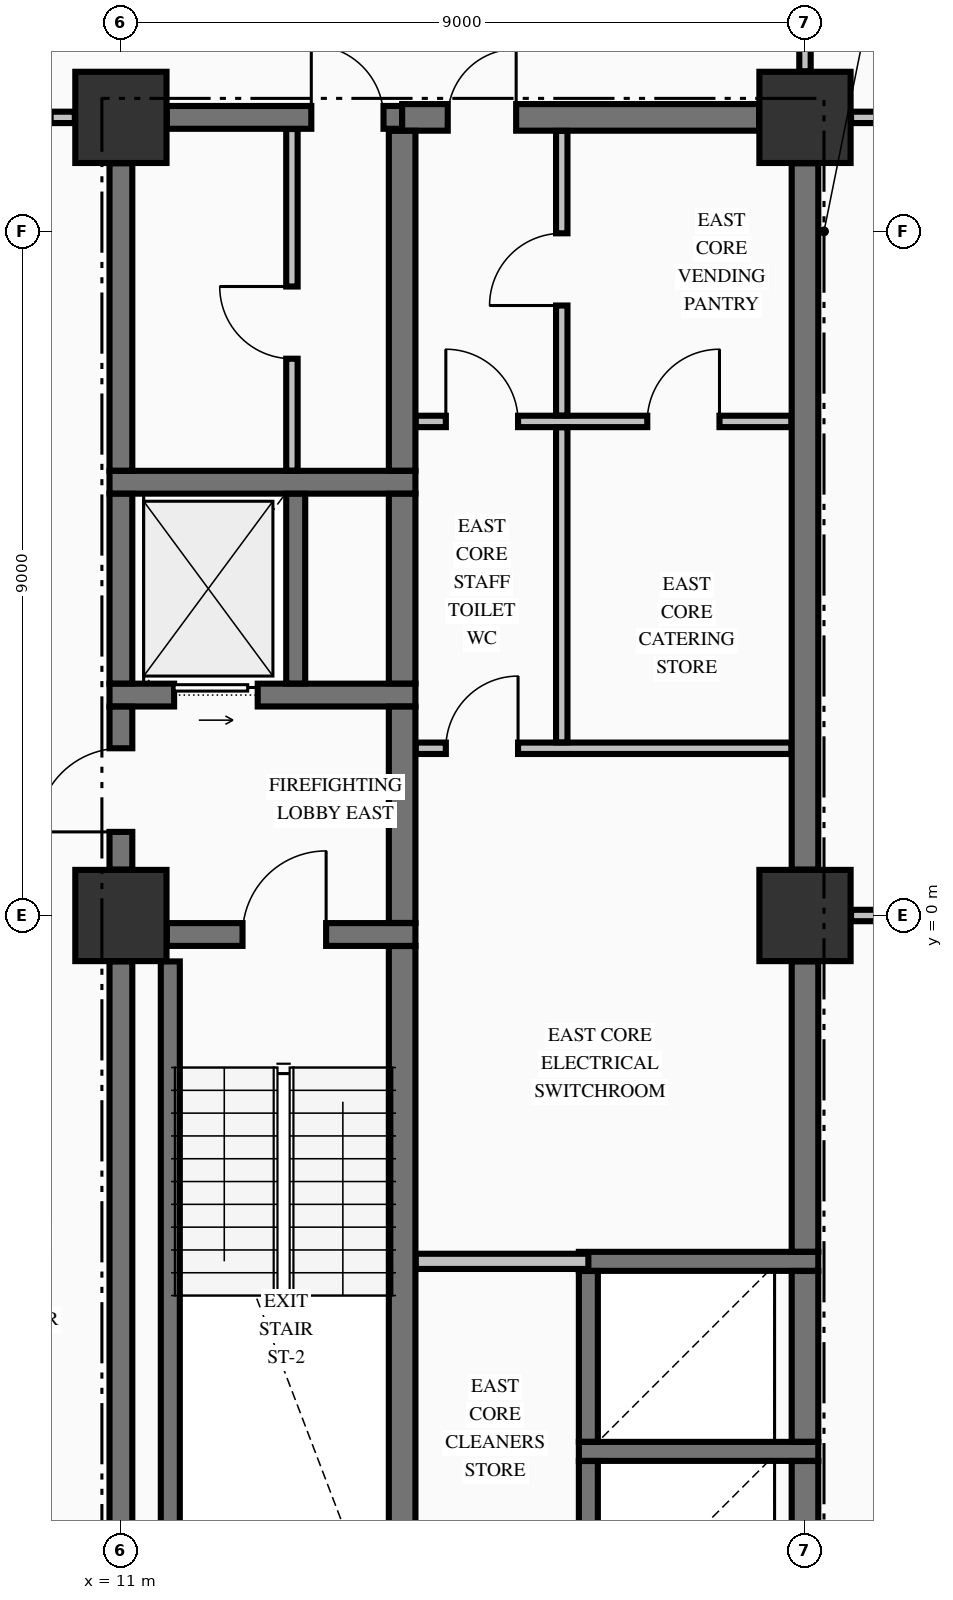
"""IFC4 building model, lengths in metres.
Left out: names, types, materials, properties, quantities, classifications, styles, units other than length and angle.
Written with IfcOpenShell. Run it as: python <this file> out.ifc"""

import sys

from ifc_helpers import new_model, si_unit, direction, frame, frame_2d, origin, origin_2d, place, context, subcontext, project, spatial, rectangle, extrude, element, fill, save


model = new_model("IFC4")
c1 = context("Model", 3, precision=1e-05, world=origin(), true_north=direction((0.0, 1.0)))
c2 = subcontext(c1, "Body", "Model", "MODEL_VIEW")
j1 = project(units=[si_unit("LENGTHUNIT", "METRE"), si_unit("PLANEANGLEUNIT", "RADIAN")], contexts=[c1])
p1 = place(None, origin())
s1 = spatial("IfcSite", under=j1, at=p1, CompositionType="ELEMENT")
p2 = place(p1, origin())
s2 = spatial("IfcBuilding", under=s1, at=p2, CompositionType="ELEMENT")
p3 = place(p2, frame((0.0, 0.0, 67.9)))
s3 = spatial("IfcBuildingStorey", under=s2, at=p3, CompositionType="ELEMENT", Elevation=67.9)
for number, where, z_axis, x_axis in (
    (1, (11.0, 0.0, -0.25), (0.0, 0.0, 1.0), (1.0, 0.0, 0.0)),
    (2, (11.0, 10.5, -0.25), (0.0, 0.0, 1.0), (1.0, 0.0, 0.0)),
    (3, (20.0, 10.5, -0.25), (0.0, 0.0, 1.0), (1.0, 0.0, 0.0)),
    (4, (20.0, 0.0, -0.25), (0.0, 0.0, 1.0), (1.0, 0.0, 0.0)),
):
    element("IfcColumn", number, at=place(p3, frame(where, z_axis=z_axis, x_axis=x_axis)), inside=s3, PredefinedType="COLUMN", context=c2, shape_type="SweptSolid", body=[
        extrude(rectangle(XDim=1.2, YDim=1.2, at=origin_2d()), origin(), (0.0, 0.0, 1.0), 3.495),
    ])
for number, where, z_axis, x_axis in (
    (5, (17.025, -7.05, 0.0), (0.0, 0.0, 1.0), (1.0, 0.0, 0.0)),
    (6, (17.025, -4.55, 0.0), (0.0, 0.0, 1.0), (1.0, 0.0, 0.0)),
):
    element("IfcWall", number, at=place(p3, frame(where, z_axis=z_axis, x_axis=x_axis)), inside=s3, PredefinedType="SOLIDWALL", context=c2, shape_type="SweptSolid", body=[
        extrude(rectangle(XDim=3.15, YDim=0.25, at=frame_2d((1.575, 0.0))), origin(), (0.0, 0.0, 1.0), 3.245),
    ])
p4 = place(p3, frame((11.604, -0.25, 0.0), z_axis=(0.0, 0.0, 1.0), x_axis=(1.0, 0.0, 0.0)))
e7 = element("IfcWall", 7, at=p4, inside=s3, PredefinedType="SHEAR", context=c2, shape_type="SweptSolid", body=[
    extrude(rectangle(XDim=3.271, YDim=0.3, at=frame_2d((1.635, 0.0))), origin(), (0.0, 0.0, 1.0), 3.245),
])
p5 = place(p4, frame((0.996, 0.0, 0.0)))
e8 = element("IfcOpeningElement", 8, at=p5, cuts=e7, PredefinedType="OPENING", context=c2, shape_type="SweptSolid", body=[
    extrude(rectangle(XDim=1.1, YDim=2.15, at=frame_2d((0.55, 1.075))), frame((0.0, 0.16, 0.0), z_axis=(0.0, -1.0, 0.0), x_axis=(1.0, 0.0, 0.0)), (0.0, 0.0, 1.0), 0.32),
])
p6 = place(p3, frame((10.85, 2.9, 0.0), z_axis=(0.0, 0.0, 1.0), x_axis=(1.0, 0.0, 0.0)))
e9 = element("IfcWall", 9, at=p6, inside=s3, PredefinedType="SHEAR", context=c2, shape_type="SweptSolid", body=[
    extrude(rectangle(XDim=4.025, YDim=0.3, at=frame_2d((2.012, 0.0))), origin(), (0.0, 0.0, 1.0), 3.245),
])
p7 = place(p6, frame((0.85, 0.0, 0.0)))
e10 = element("IfcOpeningElement", 10, at=p7, cuts=e9, PredefinedType="OPENING", context=c2, shape_type="SweptSolid", body=[
    extrude(rectangle(XDim=1.1, YDim=2.2, at=frame_2d((0.55, 1.1))), frame((0.0, 0.16, 0.0), z_axis=(0.0, -1.0, 0.0), x_axis=(1.0, 0.0, 0.0)), (0.0, 0.0, 1.0), 0.32),
])
p8 = place(p3, frame((10.85, 5.7, 0.0), z_axis=(0.0, 0.0, 1.0), x_axis=(1.0, 0.0, 0.0)))
e11 = element("IfcWall", 11, at=p8, inside=s3, PredefinedType="SHEAR", context=c2, shape_type="SweptSolid", body=[
    extrude(rectangle(XDim=4.025, YDim=0.3, at=frame_2d((2.012, 0.0))), origin(), (0.0, 0.0, 1.0), 3.245),
])
p9 = place(p3, frame((11.604, 10.5, 0.0), z_axis=(0.0, 0.0, 1.0), x_axis=(1.0, 0.0, 0.0)))
e12 = element("IfcWall", 12, at=p9, inside=s3, PredefinedType="SHEAR", context=c2, shape_type="SweptSolid", body=[
    extrude(rectangle(XDim=3.096, YDim=0.3, at=frame_2d((1.548, 0.0))), origin(), (0.0, 0.0, 1.0), 3.245),
])
p10 = place(p9, frame((1.901, 0.0, 0.0)))
e13 = element("IfcOpeningElement", 13, at=p10, cuts=e12, PredefinedType="OPENING", context=c2, shape_type="SweptSolid", body=[
    extrude(rectangle(XDim=0.95, YDim=2.15, at=frame_2d((0.475, 1.075))), frame((0.0, 0.16, 0.0), z_axis=(0.0, -1.0, 0.0), x_axis=(1.0, 0.0, 0.0)), (0.0, 0.0, 1.0), 0.32),
])
p11 = place(p3, frame((14.7, 10.5, 0.0), z_axis=(0.0, 0.0, 1.0), x_axis=(1.0, 0.0, 0.0)))
e14 = element("IfcWall", 14, at=p11, inside=s3, PredefinedType="SHEAR", context=c2, shape_type="SweptSolid", body=[
    extrude(rectangle(XDim=4.696, YDim=0.35, at=frame_2d((2.348, 0.0))), origin(), (0.0, 0.0, 1.0), 3.245),
])
p12 = place(p11, frame((0.6, 0.0, 0.0)))
e15 = element("IfcOpeningElement", 15, at=p12, cuts=e14, PredefinedType="OPENING", context=c2, shape_type="SweptSolid", body=[
    extrude(rectangle(XDim=0.9, YDim=2.15, at=frame_2d((0.45, 1.075))), frame((0.0, 0.185, 0.0), z_axis=(0.0, -1.0, 0.0), x_axis=(1.0, 0.0, 0.0)), (0.0, 0.0, 1.0), 0.37),
])
p13 = place(p3, frame((14.878, -4.55, 0.0), z_axis=(0.0, 0.0, 1.0), x_axis=(1.0, 0.0, 0.0)))
e16 = element("IfcWall", 16, at=p13, inside=s3, PredefinedType="PARTITIONING", context=c2, shape_type="SweptSolid", body=[
    extrude(rectangle(XDim=2.272, YDim=0.2, at=frame_2d((1.136, 0.0))), origin(), (0.0, 0.0, 1.0), 3.245),
])
p14 = place(p3, frame((20.606, 0.0, 0.0), z_axis=(0.0, 0.0, 1.0), x_axis=(1.0, 0.0, 0.0)))
e17 = element("IfcWall", 17, at=p14, inside=s3, PredefinedType="PARTITIONING", context=c2, shape_type="SweptSolid", body=[
    extrude(rectangle(XDim=2.688, YDim=0.15, at=frame_2d((1.344, 0.0))), origin(), (0.0, 0.0, 1.0), 2.585),
])
p15 = place(p3, frame((14.878, 2.2, 0.0), z_axis=(0.0, 0.0, 1.0), x_axis=(1.0, 0.0, 0.0)))
e18 = element("IfcWall", 18, at=p15, inside=s3, PredefinedType="PARTITIONING", context=c2, shape_type="SweptSolid", body=[
    extrude(rectangle(XDim=4.944, YDim=0.15, at=frame_2d((2.472, 0.0))), origin(), (0.0, 0.0, 1.0), 3.245),
])
p16 = place(p15, frame((0.397, 0.0, 0.0)))
e19 = element("IfcOpeningElement", 19, at=p16, cuts=e18, PredefinedType="OPENING", context=c2, shape_type="SweptSolid", body=[
    extrude(rectangle(XDim=0.95, YDim=2.15, at=frame_2d((0.475, 1.075))), frame((0.0, 0.085, 0.0), z_axis=(0.0, -1.0, 0.0), x_axis=(1.0, 0.0, 0.0)), (0.0, 0.0, 1.0), 0.17),
])
p17 = place(p3, frame((14.878, 6.5, 0.0), z_axis=(0.0, 0.0, 1.0), x_axis=(1.0, 0.0, 0.0)))
e20 = element("IfcWall", 20, at=p17, inside=s3, PredefinedType="PARTITIONING", context=c2, shape_type="SweptSolid", body=[
    extrude(rectangle(XDim=4.944, YDim=0.15, at=frame_2d((2.472, 0.0))), origin(), (0.0, 0.0, 1.0), 3.245),
])
p18 = place(p17, frame((0.397, 0.0, 0.0)))
e21 = element("IfcOpeningElement", 21, at=p18, cuts=e20, PredefinedType="OPENING", context=c2, shape_type="SweptSolid", body=[
    extrude(rectangle(XDim=0.95, YDim=2.15, at=frame_2d((0.475, 1.075))), frame((0.0, 0.085, 0.0), z_axis=(0.0, -1.0, 0.0), x_axis=(1.0, 0.0, 0.0)), (0.0, 0.0, 1.0), 0.17),
])
p19 = place(p17, frame((3.047, 0.0, 0.0)))
e22 = element("IfcOpeningElement", 22, at=p19, cuts=e20, PredefinedType="OPENING", context=c2, shape_type="SweptSolid", body=[
    extrude(rectangle(XDim=0.95, YDim=2.15, at=frame_2d((0.475, 1.075))), frame((0.0, 0.085, 0.0), z_axis=(0.0, -1.0, 0.0), x_axis=(1.0, 0.0, 0.0)), (0.0, 0.0, 1.0), 0.17),
])
p20 = place(p3, frame((-10.394, 10.5, 0.0), z_axis=(0.0, 0.0, 1.0), x_axis=(1.0, 0.0, 0.0)))
e23 = element("IfcWall", 23, at=p20, inside=s3, PredefinedType="PARTITIONING", context=c2, shape_type="SweptSolid", body=[
    extrude(rectangle(XDim=20.788, YDim=0.15, at=frame_2d((10.394, 0.0))), origin(), (0.0, 0.0, 1.0), 3.245),
])
p21 = place(p20, frame((0.319, 0.0, 0.0)))
e24 = element("IfcOpeningElement", 24, at=p21, cuts=e23, PredefinedType="OPENING", context=c2, shape_type="SweptSolid", body=[
    extrude(rectangle(XDim=1.05, YDim=2.15, at=frame_2d((0.525, 1.075))), frame((0.0, 0.085, 0.0), z_axis=(0.0, -1.0, 0.0), x_axis=(1.0, 0.0, 0.0)), (0.0, 0.0, 1.0), 0.17),
])
p22 = place(p20, frame((19.419, 0.0, 0.0)))
e25 = element("IfcOpeningElement", 25, at=p22, cuts=e23, PredefinedType="OPENING", context=c2, shape_type="SweptSolid", body=[
    extrude(rectangle(XDim=1.05, YDim=2.15, at=frame_2d((0.525, 1.075))), frame((0.0, 0.085, 0.0), z_axis=(0.0, -1.0, 0.0), x_axis=(1.0, 0.0, 0.0)), (0.0, 0.0, 1.0), 0.17),
])
p23 = place(p3, frame((20.606, 10.5, 0.0), z_axis=(0.0, 0.0, 1.0), x_axis=(1.0, 0.0, 0.0)))
e26 = element("IfcWall", 26, at=p23, inside=s3, PredefinedType="PARTITIONING", context=c2, shape_type="SweptSolid", body=[
    extrude(rectangle(XDim=3.229, YDim=0.15, at=frame_2d((1.615, 0.0))), origin(), (0.0, 0.0, 1.0), 3.245),
])
p24 = place(p23, frame((0.919, 0.0, 0.0)))
e27 = element("IfcOpeningElement", 27, at=p24, cuts=e26, PredefinedType="OPENING", context=c2, shape_type="SweptSolid", body=[
    extrude(rectangle(XDim=0.95, YDim=2.15, at=frame_2d((0.475, 1.075))), frame((0.0, 0.085, 0.0), z_axis=(0.0, -1.0, 0.0), x_axis=(1.0, 0.0, 0.0)), (0.0, 0.0, 1.0), 0.17),
])
p25 = place(p3, frame((11.0, -9.346, 0.0), z_axis=(0.0, 0.0, 1.0), x_axis=(0.0, 1.0, 0.0)))
e28 = element("IfcWall", 28, at=p25, inside=s3, PredefinedType="SHEAR", context=c2, shape_type="SweptSolid", body=[
    extrude(rectangle(XDim=8.742, YDim=0.3, at=frame_2d((4.371, 0.0))), origin(), (0.0, 0.0, 1.0), 3.245),
])
p26 = place(p3, frame((11.0, 0.604, 0.0), z_axis=(0.0, 0.0, 1.0), x_axis=(0.0, 1.0, 0.0)))
e29 = element("IfcWall", 29, at=p26, inside=s3, PredefinedType="SHEAR", context=c2, shape_type="SweptSolid", body=[
    extrude(rectangle(XDim=2.144, YDim=0.3, at=frame_2d((1.072, 0.0))), origin(), (0.0, 0.0, 1.0), 3.245),
])
p27 = place(p26, frame((0.496, 0.0, 0.0)))
e30 = element("IfcOpeningElement", 30, at=p27, cuts=e29, PredefinedType="OPENING", context=c2, shape_type="SweptSolid", body=[
    extrude(rectangle(XDim=1.1, YDim=2.15, at=frame_2d((0.55, 1.075))), frame((0.0, 0.16, 0.0), z_axis=(0.0, -1.0, 0.0), x_axis=(1.0, 0.0, 0.0)), (0.0, 0.0, 1.0), 0.32),
])
p28 = place(p3, frame((11.0, 3.052, 0.0), z_axis=(0.0, 0.0, 1.0), x_axis=(0.0, 1.0, 0.0)))
e31 = element("IfcWall", 31, at=p28, inside=s3, PredefinedType="SHEAR", context=c2, shape_type="SweptSolid", body=[
    extrude(rectangle(XDim=2.496, YDim=0.3, at=frame_2d((1.248, 0.0))), origin(), (0.0, 0.0, 1.0), 3.245),
])
p29 = place(p3, frame((11.0, 5.852, 0.0), z_axis=(0.0, 0.0, 1.0), x_axis=(0.0, 1.0, 0.0)))
e32 = element("IfcWall", 32, at=p29, inside=s3, PredefinedType="SHEAR", context=c2, shape_type="SweptSolid", body=[
    extrude(rectangle(XDim=4.044, YDim=0.3, at=frame_2d((2.022, 0.0))), origin(), (0.0, 0.0, 1.0), 3.245),
])
p30 = place(p3, frame((11.65, -9.346, 0.0), z_axis=(0.0, 0.0, 1.0), x_axis=(0.0, 1.0, 0.0)))
e33 = element("IfcWall", 33, at=p30, inside=s3, PredefinedType="SOLIDWALL", context=c2, shape_type="SweptSolid", body=[
    extrude(rectangle(XDim=8.742, YDim=0.25, at=frame_2d((4.371, 0.0))), origin(), (0.0, 0.0, 1.0), 3.245),
])
p31 = place(p3, frame((13.3, 3.052, 0.0), z_axis=(0.0, 0.0, 1.0), x_axis=(0.0, 1.0, 0.0)))
e34 = element("IfcWall", 34, at=p31, inside=s3, PredefinedType="SOLIDWALL", context=c2, shape_type="SweptSolid", body=[
    extrude(rectangle(XDim=2.496, YDim=0.25, at=frame_2d((1.248, 0.0))), origin(), (0.0, 0.0, 1.0), 3.245),
])
p32 = place(p3, frame((14.7, -9.773, 0.0), z_axis=(0.0, 0.0, 1.0), x_axis=(0.0, 1.0, 0.0)))
e35 = element("IfcWall", 35, at=p32, inside=s3, PredefinedType="SHEAR", context=c2, shape_type="SweptSolid", body=[
    extrude(rectangle(XDim=9.371, YDim=0.35, at=frame_2d((4.686, 0.0))), origin(), (0.0, 0.0, 1.0), 3.245),
])
p33 = place(p3, frame((14.7, -0.098, 0.0), z_axis=(0.0, 0.0, 1.0), x_axis=(0.0, 1.0, 0.0)))
e36 = element("IfcWall", 36, at=p33, inside=s3, PredefinedType="SHEAR", context=c2, shape_type="SweptSolid", body=[
    extrude(rectangle(XDim=2.846, YDim=0.35, at=frame_2d((1.423, 0.0))), origin(), (0.0, 0.0, 1.0), 3.245),
])
p34 = place(p3, frame((14.7, 3.052, 0.0), z_axis=(0.0, 0.0, 1.0), x_axis=(0.0, 1.0, 0.0)))
e37 = element("IfcWall", 37, at=p34, inside=s3, PredefinedType="SHEAR", context=c2, shape_type="SweptSolid", body=[
    extrude(rectangle(XDim=2.496, YDim=0.35, at=frame_2d((1.248, 0.0))), origin(), (0.0, 0.0, 1.0), 3.245),
])
p35 = place(p3, frame((14.7, 5.852, 0.0), z_axis=(0.0, 0.0, 1.0), x_axis=(0.0, 1.0, 0.0)))
e38 = element("IfcWall", 38, at=p35, inside=s3, PredefinedType="SHEAR", context=c2, shape_type="SweptSolid", body=[
    extrude(rectangle(XDim=4.471, YDim=0.35, at=frame_2d((2.235, 0.0))), origin(), (0.0, 0.0, 1.0), 3.245),
])
p36 = place(p3, frame((17.15, -9.773, 0.0), z_axis=(0.0, 0.0, 1.0), x_axis=(0.0, 1.0, 0.0)))
e39 = element("IfcWall", 39, at=p36, inside=s3, PredefinedType="SOLIDWALL", context=c2, shape_type="SweptSolid", body=[
    extrude(rectangle(XDim=2.596, YDim=0.25, at=frame_2d((1.298, 0.0))), origin(), (0.0, 0.0, 1.0), 3.245),
])
p37 = place(p3, frame((17.15, -6.923, 0.0), z_axis=(0.0, 0.0, 1.0), x_axis=(0.0, 1.0, 0.0)))
e40 = element("IfcWall", 40, at=p37, inside=s3, PredefinedType="SOLIDWALL", context=c2, shape_type="SweptSolid", body=[
    extrude(rectangle(XDim=2.246, YDim=0.25, at=frame_2d((1.123, 0.0))), origin(), (0.0, 0.0, 1.0), 3.245),
])
p38 = place(p3, frame((20.0, -9.346, 0.0), z_axis=(0.0, 0.0, 1.0), x_axis=(0.0, 1.0, 0.0)))
e41 = element("IfcWall", 41, at=p38, inside=s3, PredefinedType="SHEAR", context=c2, shape_type="SweptSolid", body=[
    extrude(rectangle(XDim=2.169, YDim=0.35, at=frame_2d((1.084, 0.0))), origin(), (0.0, 0.0, 1.0), 3.245),
])
p39 = place(p3, frame((20.0, -6.923, 0.0), z_axis=(0.0, 0.0, 1.0), x_axis=(0.0, 1.0, 0.0)))
e42 = element("IfcWall", 42, at=p39, inside=s3, PredefinedType="SHEAR", context=c2, shape_type="SweptSolid", body=[
    extrude(rectangle(XDim=2.246, YDim=0.35, at=frame_2d((1.123, 0.0))), origin(), (0.0, 0.0, 1.0), 3.245),
])
p40 = place(p3, frame((20.0, -4.423, 0.0), z_axis=(0.0, 0.0, 1.0), x_axis=(0.0, 1.0, 0.0)))
e43 = element("IfcWall", 43, at=p40, inside=s3, PredefinedType="SHEAR", context=c2, shape_type="SweptSolid", body=[
    extrude(rectangle(XDim=3.819, YDim=0.35, at=frame_2d((1.91, 0.0))), origin(), (0.0, 0.0, 1.0), 3.245),
])
p41 = place(p3, frame((20.0, 0.604, 0.0), z_axis=(0.0, 0.0, 1.0), x_axis=(0.0, 1.0, 0.0)))
e44 = element("IfcWall", 44, at=p41, inside=s3, PredefinedType="SHEAR", context=c2, shape_type="SweptSolid", body=[
    extrude(rectangle(XDim=9.292, YDim=0.35, at=frame_2d((4.646, 0.0))), origin(), (0.0, 0.0, 1.0), 3.245),
])
p42 = place(p3, frame((13.25, 5.853, 0.0), z_axis=(0.0, 0.0, 1.0), x_axis=(0.0, 1.0, 0.0)))
e45 = element("IfcWall", 45, at=p42, inside=s3, PredefinedType="PARTITIONING", context=c2, shape_type="SweptSolid", body=[
    extrude(rectangle(XDim=4.494, YDim=0.15, at=frame_2d((2.247, 0.0))), origin(), (0.0, 0.0, 1.0), 3.245),
])
p43 = place(p42, frame((1.472, 0.0, 0.0)))
e46 = element("IfcOpeningElement", 46, at=p43, cuts=e45, PredefinedType="OPENING", context=c2, shape_type="SweptSolid", body=[
    extrude(rectangle(XDim=0.95, YDim=2.15, at=frame_2d((0.475, 1.075))), frame((0.0, 0.085, 0.0), z_axis=(0.0, -1.0, 0.0), x_axis=(1.0, 0.0, 0.0)), (0.0, 0.0, 1.0), 0.17),
])
p44 = place(p3, frame((16.8, 2.278, 0.0), z_axis=(0.0, 0.0, 1.0), x_axis=(0.0, 1.0, 0.0)))
e47 = element("IfcWall", 47, at=p44, inside=s3, PredefinedType="PARTITIONING", context=c2, shape_type="SweptSolid", body=[
    extrude(rectangle(XDim=4.144, YDim=0.15, at=frame_2d((2.072, 0.0))), origin(), (0.0, 0.0, 1.0), 3.245),
])
p45 = place(p3, frame((16.8, 6.578, 0.0), z_axis=(0.0, 0.0, 1.0), x_axis=(0.0, 1.0, 0.0)))
e48 = element("IfcWall", 48, at=p45, inside=s3, PredefinedType="PARTITIONING", context=c2, shape_type="SweptSolid", body=[
    extrude(rectangle(XDim=3.744, YDim=0.15, at=frame_2d((1.872, 0.0))), origin(), (0.0, 0.0, 1.0), 3.245),
])
p46 = place(p45, frame((1.447, 0.0, 0.0)))
e49 = element("IfcOpeningElement", 49, at=p46, cuts=e48, PredefinedType="OPENING", context=c2, shape_type="SweptSolid", body=[
    extrude(rectangle(XDim=0.95, YDim=2.15, at=frame_2d((0.475, 1.075))), frame((0.0, 0.085, 0.0), z_axis=(0.0, -1.0, 0.0), x_axis=(1.0, 0.0, 0.0)), (0.0, 0.0, 1.0), 0.17),
])
p47 = place(p3, frame((20.0, 11.106, 0.0), z_axis=(0.0, 0.0, 1.0), x_axis=(0.0, 1.0, 0.0)))
e50 = element("IfcWall", 50, at=p47, inside=s3, PredefinedType="PARTITIONING", context=c2, shape_type="SweptSolid", body=[
    extrude(rectangle(XDim=2.366, YDim=0.15, at=frame_2d((1.183, 0.0))), origin(), (0.0, 0.0, 1.0), 3.245),
])
p48 = place(p47, frame((0.449, 0.0, 0.0)))
e51 = element("IfcOpeningElement", 51, at=p48, cuts=e50, PredefinedType="OPENING", context=c2, shape_type="SweptSolid", body=[
    extrude(rectangle(XDim=0.95, YDim=2.15, at=frame_2d((0.475, 1.075))), frame((0.0, 0.085, 0.0), z_axis=(0.0, -1.0, 0.0), x_axis=(1.0, 0.0, 0.0)), (0.0, 0.0, 1.0), 0.17),
])
p49 = place(p5, origin())
e52 = element("IfcDoor", 52, at=p49, inside=s3, OperationType="SINGLE_SWING_RIGHT", PredefinedType="DOOR", context=c2, shape_type="SweptSolid", body=[
    extrude(rectangle(XDim=1.1, YDim=2.15, at=frame_2d((0.55, 1.075))), frame((0.0, 0.025, 0.0), z_axis=(0.0, -1.0, 0.0), x_axis=(1.0, 0.0, 0.0)), (0.0, 0.0, 1.0), 0.05),
])
fill(e8, e52)
p50 = place(p27, origin())
e53 = element("IfcDoor", 53, at=p50, inside=s3, OperationType="SINGLE_SWING_LEFT", PredefinedType="DOOR", context=c2, shape_type="SweptSolid", body=[
    extrude(rectangle(XDim=1.1, YDim=2.15, at=frame_2d((0.55, 1.075))), frame((0.0, 0.025, 0.0), z_axis=(0.0, -1.0, 0.0), x_axis=(1.0, 0.0, 0.0)), (0.0, 0.0, 1.0), 0.05),
])
fill(e30, e53)
p51 = place(p7, origin())
e54 = element("IfcDoor", 54, at=p51, inside=s3, OperationType="SLIDING_TO_RIGHT", PredefinedType="DOOR", context=c2, shape_type="SweptSolid", body=[
    extrude(rectangle(XDim=1.1, YDim=2.2, at=frame_2d((0.55, 1.1))), frame((0.0, 0.025, 0.0), z_axis=(0.0, -1.0, 0.0), x_axis=(1.0, 0.0, 0.0)), (0.0, 0.0, 1.0), 0.05),
])
fill(e10, e54)
p52 = place(p10, origin())
e55 = element("IfcDoor", 55, at=p52, inside=s3, OperationType="SINGLE_SWING_LEFT", PredefinedType="DOOR", context=c2, shape_type="SweptSolid", body=[
    extrude(rectangle(XDim=0.95, YDim=2.15, at=frame_2d((0.475, 1.075))), frame((0.0, 0.025, 0.0), z_axis=(0.0, -1.0, 0.0), x_axis=(1.0, 0.0, 0.0)), (0.0, 0.0, 1.0), 0.05),
])
fill(e13, e55)
p53 = place(p43, origin())
e56 = element("IfcDoor", 56, at=p53, inside=s3, OperationType="SINGLE_SWING_RIGHT", PredefinedType="DOOR", context=c2, shape_type="SweptSolid", body=[
    extrude(rectangle(XDim=0.95, YDim=2.15, at=frame_2d((0.475, 1.075))), frame((0.0, 0.025, 0.0), z_axis=(0.0, -1.0, 0.0), x_axis=(1.0, 0.0, 0.0)), (0.0, 0.0, 1.0), 0.05),
])
fill(e46, e56)
p54 = place(p12, origin())
e57 = element("IfcDoor", 57, at=p54, inside=s3, OperationType="SINGLE_SWING_RIGHT", PredefinedType="DOOR", context=c2, shape_type="SweptSolid", body=[
    extrude(rectangle(XDim=0.9, YDim=2.15, at=frame_2d((0.45, 1.075))), frame((0.0, 0.025, 0.0), z_axis=(0.0, -1.0, 0.0), x_axis=(1.0, 0.0, 0.0)), (0.0, 0.0, 1.0), 0.05),
])
fill(e15, e57)
p55 = place(p18, origin())
e58 = element("IfcDoor", 58, at=p55, inside=s3, OperationType="SINGLE_SWING_LEFT", PredefinedType="DOOR", context=c2, shape_type="SweptSolid", body=[
    extrude(rectangle(XDim=0.95, YDim=2.15, at=frame_2d((0.475, 1.075))), frame((0.0, 0.025, 0.0), z_axis=(0.0, -1.0, 0.0), x_axis=(1.0, 0.0, 0.0)), (0.0, 0.0, 1.0), 0.05),
])
fill(e21, e58)
p56 = place(p16, origin())
e59 = element("IfcDoor", 59, at=p56, inside=s3, OperationType="SINGLE_SWING_RIGHT", PredefinedType="DOOR", context=c2, shape_type="SweptSolid", body=[
    extrude(rectangle(XDim=0.95, YDim=2.15, at=frame_2d((0.475, 1.075))), frame((0.0, 0.025, 0.0), z_axis=(0.0, -1.0, 0.0), x_axis=(1.0, 0.0, 0.0)), (0.0, 0.0, 1.0), 0.05),
])
fill(e19, e59)
p57 = place(p46, origin())
e60 = element("IfcDoor", 60, at=p57, inside=s3, OperationType="SINGLE_SWING_LEFT", PredefinedType="DOOR", context=c2, shape_type="SweptSolid", body=[
    extrude(rectangle(XDim=0.95, YDim=2.15, at=frame_2d((0.475, 1.075))), frame((0.0, 0.025, 0.0), z_axis=(0.0, -1.0, 0.0), x_axis=(1.0, 0.0, 0.0)), (0.0, 0.0, 1.0), 0.05),
])
fill(e49, e60)
p58 = place(p19, origin())
e61 = element("IfcDoor", 61, at=p58, inside=s3, OperationType="SINGLE_SWING_RIGHT", PredefinedType="DOOR", context=c2, shape_type="SweptSolid", body=[
    extrude(rectangle(XDim=0.95, YDim=2.15, at=frame_2d((0.475, 1.075))), frame((0.0, 0.025, 0.0), z_axis=(0.0, -1.0, 0.0), x_axis=(1.0, 0.0, 0.0)), (0.0, 0.0, 1.0), 0.05),
])
fill(e22, e61)
save(model, sys.argv[1])
